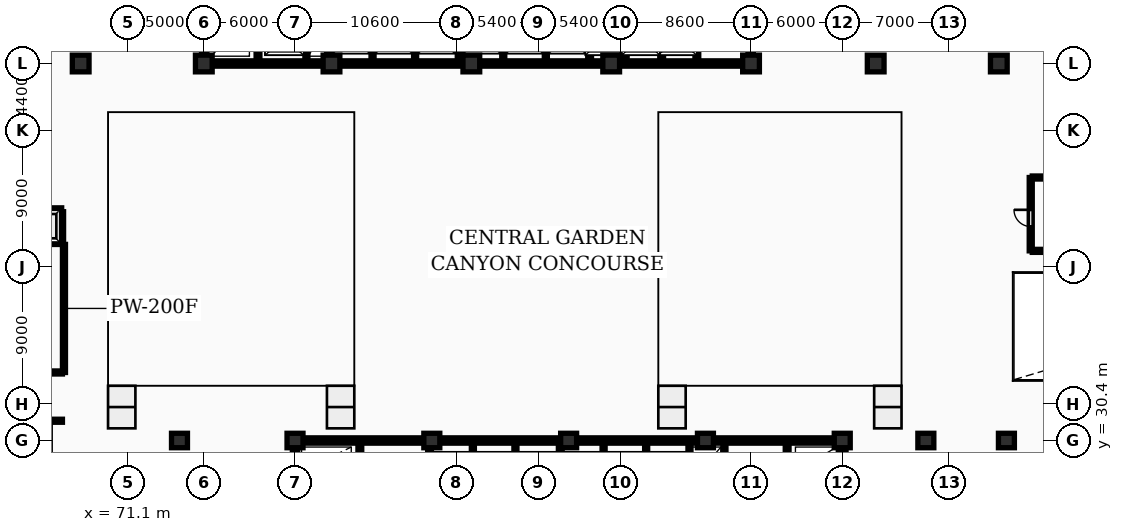
"""IFC4 building model, lengths in metres.
Left out: names, types, materials, properties, quantities, classifications, styles, units other than length and angle.
Written with IfcOpenShell. Run it as: python <this file> out.ifc"""

import sys

from ifc_helpers import new_model, si_unit, direction, frame, frame_2d, origin, origin_2d, place, context, subcontext, project, spatial, rectangle, extrude, element, fill, save


model = new_model("IFC4")
c1 = context("Model", 3, precision=1e-05, world=origin(), true_north=direction((0.0, 1.0)))
c2 = subcontext(c1, "Body", "Model", "MODEL_VIEW")
j1 = project(units=[si_unit("LENGTHUNIT", "METRE"), si_unit("PLANEANGLEUNIT", "RADIAN")], contexts=[c1])
p1 = place(None, origin())
s1 = spatial("IfcSite", under=j1, at=p1, CompositionType="ELEMENT")
p2 = place(p1, origin())
s2 = spatial("IfcBuilding", under=s1, at=p2, CompositionType="ELEMENT")
p3 = place(p2, origin())
s3 = spatial("IfcBuildingStorey", under=s2, at=p3, CompositionType="ELEMENT", Elevation=0.0)
for number, where, z_axis, x_axis in (
    (1, (68.0, 55.2, 0.0), (0.0, 0.0, 1.0), (1.0, 0.0, 0.0)),
    (2, (76.1, 55.2, 0.0), (0.0, 0.0, 1.0), (1.0, 0.0, 0.0)),
    (3, (84.5, 55.2, 0.0), (0.0, 0.0, 1.0), (1.0, 0.0, 0.0)),
    (4, (93.7, 55.2, 0.0), (0.0, 0.0, 1.0), (1.0, 0.0, 0.0)),
    (5, (102.9, 55.2, 0.0), (0.0, 0.0, 1.0), (1.0, 0.0, 0.0)),
    (6, (112.1, 55.2, 0.0), (0.0, 0.0, 1.0), (1.0, 0.0, 0.0)),
    (7, (120.3, 55.2, 0.0), (0.0, 0.0, 1.0), (1.0, 0.0, 0.0)),
    (8, (128.4, 55.2, 0.0), (0.0, 0.0, 1.0), (1.0, 0.0, 0.0)),
):
    element("IfcColumn", number, at=place(p3, frame(where, z_axis=z_axis, x_axis=x_axis)), inside=s3, PredefinedType="COLUMN", context=c2, shape_type="SweptSolid", body=[
        extrude(rectangle(XDim=1.1, YDim=1.1, at=origin_2d()), origin(), (0.0, 0.0, 1.0), 5.4),
    ])
for number, where, z_axis, x_axis in (
    (9, (74.5, 30.4, 0.0), (0.0, 0.0, 1.0), (1.0, 0.0, 0.0)),
    (10, (82.1, 30.4, 0.0), (0.0, 0.0, 1.0), (1.0, 0.0, 0.0)),
    (11, (91.1, 30.4, 0.0), (0.0, 0.0, 1.0), (1.0, 0.0, 0.0)),
    (12, (100.1, 30.4, 0.0), (0.0, 0.0, 1.0), (1.0, 0.0, 0.0)),
    (13, (109.1, 30.4, 0.0), (0.0, 0.0, 1.0), (1.0, 0.0, 0.0)),
    (14, (118.1, 30.4, 0.0), (0.0, 0.0, 1.0), (1.0, 0.0, 0.0)),
    (15, (123.6, 30.4, 0.0), (0.0, 0.0, 1.0), (1.0, 0.0, 0.0)),
    (16, (128.9, 30.4, 0.0), (0.0, 0.0, 1.0), (1.0, 0.0, 0.0)),
):
    element("IfcColumn", number, at=place(p3, frame(where, z_axis=z_axis, x_axis=x_axis)), inside=s3, PredefinedType="COLUMN", context=c2, shape_type="SweptSolid", body=[
        extrude(rectangle(XDim=1.05, YDim=0.95, at=origin_2d()), origin(), (0.0, 0.0, 1.0), 5.4),
    ])
p4 = place(p3, frame((75.95, 55.2, 0.0), z_axis=(0.0, 0.0, 1.0), x_axis=(1.0, 0.0, 0.0)))
e17 = element("IfcWall", 17, at=p4, inside=s3, PredefinedType="SHEAR", context=c2, shape_type="SweptSolid", body=[
    extrude(rectangle(XDim=36.3, YDim=0.35, at=frame_2d((18.15, 0.0))), origin(), (0.0, 0.0, 1.0), 5.4),
])
for number, where, z_axis, x_axis in (
    (18, (76.125, 55.375, 0.0), (0.0, 0.0, 1.0), (0.0, 1.0, 0.0)),
    (19, (112.075, 55.375, 0.0), (0.0, 0.0, 1.0), (0.0, 1.0, 0.0)),
):
    element("IfcWall", number, at=place(p3, frame(where, z_axis=z_axis, x_axis=x_axis)), inside=s3, PredefinedType="SHEAR", context=c2, shape_type="SweptSolid", body=[
        extrude(rectangle(XDim=11.65, YDim=0.35, at=frame_2d((5.825, 0.0))), origin(), (0.0, 0.0, 1.0), 5.4),
    ])
p5 = place(p3, frame((79.665, 55.4, 0.0), z_axis=(0.0, 0.0, 1.0), x_axis=(0.0, 1.0, 0.0)))
e20 = element("IfcWall", 20, at=p5, inside=s3, PredefinedType="SHEAR", context=c2, shape_type="SweptSolid", body=[
    extrude(rectangle(XDim=11.6, YDim=0.25, at=frame_2d((5.8, 0.0))), origin(), (0.0, 0.0, 1.0), 5.4),
])
p6 = place(p5, frame((0.55, 0.0, 0.0)))
e21 = element("IfcOpeningElement", 21, at=p6, cuts=e20, PredefinedType="OPENING", context=c2, shape_type="SweptSolid", body=[
    extrude(rectangle(XDim=0.85, YDim=2.05, at=frame_2d((0.425, 1.025))), frame((0.0, 0.135, 0.0), z_axis=(0.0, -1.0, 0.0), x_axis=(1.0, 0.0, 0.0)), (0.0, 0.0, 1.0), 0.27),
])
p7 = place(p5, frame((8.4, 0.0, 0.0)))
e22 = element("IfcOpeningElement", 22, at=p7, cuts=e20, PredefinedType="OPENING", context=c2, shape_type="SweptSolid", body=[
    extrude(rectangle(XDim=1.1, YDim=2.1, at=frame_2d((0.55, 1.05))), frame((0.0, 0.135, 0.0), z_axis=(0.0, -1.0, 0.0), x_axis=(1.0, 0.0, 0.0)), (0.0, 0.0, 1.0), 0.27),
])
p8 = place(p5, frame((10.25, 0.0, 0.0)))
e23 = element("IfcOpeningElement", 23, at=p8, cuts=e20, PredefinedType="OPENING", context=c2, shape_type="SweptSolid", body=[
    extrude(rectangle(XDim=0.85, YDim=2.05, at=frame_2d((0.425, 1.025))), frame((0.0, 0.135, 0.0), z_axis=(0.0, -1.0, 0.0), x_axis=(1.0, 0.0, 0.0)), (0.0, 0.0, 1.0), 0.27),
])
p9 = place(p3, frame((82.85, 55.4, 0.0), z_axis=(0.0, 0.0, 1.0), x_axis=(0.0, 1.0, 0.0)))
e24 = element("IfcWall", 24, at=p9, inside=s3, PredefinedType="PARTITIONING", context=c2, shape_type="SweptSolid", body=[
    extrude(rectangle(XDim=2.56, YDim=0.2, at=frame_2d((1.28, 0.0))), origin(), (0.0, 0.0, 1.0), 5.1),
])
p10 = place(p3, frame((84.3, 55.4, 0.0), z_axis=(0.0, 0.0, 1.0), x_axis=(0.0, 1.0, 0.0)))
e25 = element("IfcWall", 25, at=p10, inside=s3, PredefinedType="SHEAR", context=c2, shape_type="SweptSolid", body=[
    extrude(rectangle(XDim=11.6, YDim=0.25, at=frame_2d((5.8, 0.0))), origin(), (0.0, 0.0, 1.0), 5.4),
])
p11 = place(p10, frame((5.2, 0.0, 0.0)))
e26 = element("IfcOpeningElement", 26, at=p11, cuts=e25, PredefinedType="OPENING", context=c2, shape_type="SweptSolid", body=[
    extrude(rectangle(XDim=1.1, YDim=2.1, at=frame_2d((0.55, 1.05))), frame((0.0, 0.135, 0.0), z_axis=(0.0, -1.0, 0.0), x_axis=(1.0, 0.0, 0.0)), (0.0, 0.0, 1.0), 0.27),
])
for number, where, z_axis, x_axis in (
    (27, (87.2, 55.4, 0.0), (0.0, 0.0, 1.0), (0.0, 1.0, 0.0)),
    (28, (90.0, 55.4, 0.0), (0.0, 0.0, 1.0), (0.0, 1.0, 0.0)),
):
    element("IfcWall", number, at=place(p3, frame(where, z_axis=z_axis, x_axis=x_axis)), inside=s3, PredefinedType="PARTITIONING", context=c2, shape_type="SweptSolid", body=[
        extrude(rectangle(XDim=2.72, YDim=0.2, at=frame_2d((1.36, 0.0))), origin(), (0.0, 0.0, 1.0), 5.1),
    ])
p12 = place(p3, frame((92.9, 55.4, 0.0), z_axis=(0.0, 0.0, 1.0), x_axis=(0.0, 1.0, 0.0)))
e29 = element("IfcWall", 29, at=p12, inside=s3, PredefinedType="SHEAR", context=c2, shape_type="SweptSolid", body=[
    extrude(rectangle(XDim=2.85, YDim=0.25, at=frame_2d((1.425, 0.0))), origin(), (0.0, 0.0, 1.0), 5.4),
])
for number, where, z_axis, x_axis in (
    (30, (95.8, 55.4, 0.0), (0.0, 0.0, 1.0), (0.0, 1.0, 0.0)),
    (31, (98.6, 55.4, 0.0), (0.0, 0.0, 1.0), (0.0, 1.0, 0.0)),
):
    element("IfcWall", number, at=place(p3, frame(where, z_axis=z_axis, x_axis=x_axis)), inside=s3, PredefinedType="PARTITIONING", context=c2, shape_type="SweptSolid", body=[
        extrude(rectangle(XDim=2.72, YDim=0.2, at=frame_2d((1.36, 0.0))), origin(), (0.0, 0.0, 1.0), 5.1),
    ])
p13 = place(p3, frame((101.48, 55.4, 0.0), z_axis=(0.0, 0.0, 1.0), x_axis=(0.0, 1.0, 0.0)))
e32 = element("IfcWall", 32, at=p13, inside=s3, PredefinedType="SHEAR", context=c2, shape_type="SweptSolid", body=[
    extrude(rectangle(XDim=2.85, YDim=0.25, at=frame_2d((1.425, 0.0))), origin(), (0.0, 0.0, 1.0), 5.4),
])
p14 = place(p3, frame((103.85, 55.4, 0.0), z_axis=(0.0, 0.0, 1.0), x_axis=(0.0, 1.0, 0.0)))
e33 = element("IfcWall", 33, at=p14, inside=s3, PredefinedType="PARTITIONING", context=c2, shape_type="SweptSolid", body=[
    extrude(rectangle(XDim=2.72, YDim=0.2, at=frame_2d((1.36, 0.0))), origin(), (0.0, 0.0, 1.0), 5.1),
])
p15 = place(p3, frame((106.22, 55.4, 0.0), z_axis=(0.0, 0.0, 1.0), x_axis=(0.0, 1.0, 0.0)))
e34 = element("IfcWall", 34, at=p15, inside=s3, PredefinedType="SHEAR", context=c2, shape_type="SweptSolid", body=[
    extrude(rectangle(XDim=2.85, YDim=0.25, at=frame_2d((1.425, 0.0))), origin(), (0.0, 0.0, 1.0), 5.4),
])
p16 = place(p3, frame((108.535, 55.4, 0.0), z_axis=(0.0, 0.0, 1.0), x_axis=(0.0, 1.0, 0.0)))
e35 = element("IfcWall", 35, at=p16, inside=s3, PredefinedType="SHEAR", context=c2, shape_type="SweptSolid", body=[
    extrude(rectangle(XDim=11.6, YDim=0.25, at=frame_2d((5.8, 0.0))), origin(), (0.0, 0.0, 1.0), 5.4),
])
p17 = place(p16, frame((8.2, 0.0, 0.0)))
e36 = element("IfcOpeningElement", 36, at=p17, cuts=e35, PredefinedType="OPENING", context=c2, shape_type="SweptSolid", body=[
    extrude(rectangle(XDim=1.1, YDim=2.1, at=frame_2d((0.55, 1.05))), frame((0.0, 0.135, 0.0), z_axis=(0.0, -1.0, 0.0), x_axis=(1.0, 0.0, 0.0)), (0.0, 0.0, 1.0), 0.27),
])
p18 = place(p16, frame((10.25, 0.0, 0.0)))
e37 = element("IfcOpeningElement", 37, at=p18, cuts=e35, PredefinedType="OPENING", context=c2, shape_type="SweptSolid", body=[
    extrude(rectangle(XDim=0.85, YDim=2.05, at=frame_2d((0.425, 1.025))), frame((0.0, 0.135, 0.0), z_axis=(0.0, -1.0, 0.0), x_axis=(1.0, 0.0, 0.0)), (0.0, 0.0, 1.0), 0.27),
])
p19 = place(p3, frame((81.925, 30.4, 0.0), z_axis=(0.0, 0.0, 1.0), x_axis=(1.0, 0.0, 0.0)))
e38 = element("IfcWall", 38, at=p19, inside=s3, PredefinedType="SHEAR", context=c2, shape_type="SweptSolid", body=[
    extrude(rectangle(XDim=36.265, YDim=0.35, at=frame_2d((18.132, 0.0))), origin(), (0.0, 0.0, 1.0), 5.4),
])
for number, where, z_axis, x_axis in (
    (39, (82.1, 18.575, 0.0), (0.0, 0.0, 1.0), (0.0, 1.0, 0.0)),
    (40, (118.015, 18.575, 0.0), (0.0, 0.0, 1.0), (0.0, 1.0, 0.0)),
):
    element("IfcWall", number, at=place(p3, frame(where, z_axis=z_axis, x_axis=x_axis)), inside=s3, PredefinedType="SHEAR", context=c2, shape_type="SweptSolid", body=[
        extrude(rectangle(XDim=11.65, YDim=0.35, at=frame_2d((5.825, 0.0))), origin(), (0.0, 0.0, 1.0), 5.4),
    ])
p20 = place(p3, frame((86.365, 18.6, 0.0), z_axis=(0.0, 0.0, 1.0), x_axis=(0.0, 1.0, 0.0)))
e41 = element("IfcWall", 41, at=p20, inside=s3, PredefinedType="SHEAR", context=c2, shape_type="SweptSolid", body=[
    extrude(rectangle(XDim=11.6, YDim=0.25, at=frame_2d((5.8, 0.0))), origin(), (0.0, 0.0, 1.0), 5.4),
])
p21 = place(p20, frame((0.45, 0.0, 0.0)))
e42 = element("IfcOpeningElement", 42, at=p21, cuts=e41, PredefinedType="OPENING", context=c2, shape_type="SweptSolid", body=[
    extrude(rectangle(XDim=0.85, YDim=2.05, at=frame_2d((0.425, 1.025))), frame((0.0, 0.135, 0.0), z_axis=(0.0, -1.0, 0.0), x_axis=(1.0, 0.0, 0.0)), (0.0, 0.0, 1.0), 0.27),
])
p22 = place(p20, frame((2.05, 0.0, 0.0)))
e43 = element("IfcOpeningElement", 43, at=p22, cuts=e41, PredefinedType="OPENING", context=c2, shape_type="SweptSolid", body=[
    extrude(rectangle(XDim=1.1, YDim=2.1, at=frame_2d((0.55, 1.05))), frame((0.0, 0.135, 0.0), z_axis=(0.0, -1.0, 0.0), x_axis=(1.0, 0.0, 0.0)), (0.0, 0.0, 1.0), 0.27),
])
p23 = place(p20, frame((9.95, 0.0, 0.0)))
e44 = element("IfcOpeningElement", 44, at=p23, cuts=e41, PredefinedType="OPENING", context=c2, shape_type="SweptSolid", body=[
    extrude(rectangle(XDim=0.85, YDim=2.05, at=frame_2d((0.425, 1.025))), frame((0.0, 0.135, 0.0), z_axis=(0.0, -1.0, 0.0), x_axis=(1.0, 0.0, 0.0)), (0.0, 0.0, 1.0), 0.27),
])
p24 = place(p3, frame((90.95, 18.6, 0.0), z_axis=(0.0, 0.0, 1.0), x_axis=(0.0, 1.0, 0.0)))
e45 = element("IfcWall", 45, at=p24, inside=s3, PredefinedType="SHEAR", context=c2, shape_type="SweptSolid", body=[
    extrude(rectangle(XDim=11.6, YDim=0.25, at=frame_2d((5.8, 0.0))), origin(), (0.0, 0.0, 1.0), 5.4),
])
p25 = place(p24, frame((4.6, 0.0, 0.0)))
e46 = element("IfcOpeningElement", 46, at=p25, cuts=e45, PredefinedType="OPENING", context=c2, shape_type="SweptSolid", body=[
    extrude(rectangle(XDim=1.1, YDim=2.1, at=frame_2d((0.55, 1.05))), frame((0.0, 0.135, 0.0), z_axis=(0.0, -1.0, 0.0), x_axis=(1.0, 0.0, 0.0)), (0.0, 0.0, 1.0), 0.27),
])
for number, where, z_axis, x_axis in (
    (47, (93.8, 27.38, 0.0), (0.0, 0.0, 1.0), (0.0, 1.0, 0.0)),
    (48, (96.6, 27.38, 0.0), (0.0, 0.0, 1.0), (0.0, 1.0, 0.0)),
):
    element("IfcWall", number, at=place(p3, frame(where, z_axis=z_axis, x_axis=x_axis)), inside=s3, PredefinedType="PARTITIONING", context=c2, shape_type="SweptSolid", body=[
        extrude(rectangle(XDim=2.82, YDim=0.2, at=frame_2d((1.41, 0.0))), origin(), (0.0, 0.0, 1.0), 5.1),
    ])
p26 = place(p3, frame((99.55, 27.25, 0.0), z_axis=(0.0, 0.0, 1.0), x_axis=(0.0, 1.0, 0.0)))
e49 = element("IfcWall", 49, at=p26, inside=s3, PredefinedType="SHEAR", context=c2, shape_type="SweptSolid", body=[
    extrude(rectangle(XDim=2.95, YDim=0.25, at=frame_2d((1.475, 0.0))), origin(), (0.0, 0.0, 1.0), 5.4),
])
for number, where, z_axis, x_axis in (
    (50, (102.4, 27.38, 0.0), (0.0, 0.0, 1.0), (0.0, 1.0, 0.0)),
    (51, (105.2, 27.38, 0.0), (0.0, 0.0, 1.0), (0.0, 1.0, 0.0)),
    (52, (108.05, 27.38, 0.0), (0.0, 0.0, 1.0), (0.0, 1.0, 0.0)),
):
    element("IfcWall", number, at=place(p3, frame(where, z_axis=z_axis, x_axis=x_axis)), inside=s3, PredefinedType="PARTITIONING", context=c2, shape_type="SweptSolid", body=[
        extrude(rectangle(XDim=2.82, YDim=0.2, at=frame_2d((1.41, 0.0))), origin(), (0.0, 0.0, 1.0), 5.1),
    ])
p27 = place(p3, frame((110.35, 18.6, 0.0), z_axis=(0.0, 0.0, 1.0), x_axis=(0.0, 1.0, 0.0)))
e53 = element("IfcWall", 53, at=p27, inside=s3, PredefinedType="PARTITIONING", context=c2, shape_type="SweptSolid", body=[
    extrude(rectangle(XDim=11.6, YDim=0.2, at=frame_2d((5.8, 0.0))), origin(), (0.0, 0.0, 1.0), 5.1),
])
p28 = place(p27, frame((5.2, 0.0, 0.0)))
e54 = element("IfcOpeningElement", 54, at=p28, cuts=e53, PredefinedType="OPENING", context=c2, shape_type="SweptSolid", body=[
    extrude(rectangle(XDim=1.1, YDim=2.15, at=frame_2d((0.55, 1.075))), frame((0.0, 0.11, 0.0), z_axis=(0.0, -1.0, 0.0), x_axis=(1.0, 0.0, 0.0)), (0.0, 0.0, 1.0), 0.22),
])
p29 = place(p3, frame((114.475, 18.6, 0.0), z_axis=(0.0, 0.0, 1.0), x_axis=(0.0, 1.0, 0.0)))
e55 = element("IfcWall", 55, at=p29, inside=s3, PredefinedType="SHEAR", context=c2, shape_type="SweptSolid", body=[
    extrude(rectangle(XDim=11.6, YDim=0.25, at=frame_2d((5.8, 0.0))), origin(), (0.0, 0.0, 1.0), 5.4),
])
p30 = place(p29, frame((0.45, 0.0, 0.0)))
e56 = element("IfcOpeningElement", 56, at=p30, cuts=e55, PredefinedType="OPENING", context=c2, shape_type="SweptSolid", body=[
    extrude(rectangle(XDim=0.85, YDim=2.05, at=frame_2d((0.425, 1.025))), frame((0.0, 0.135, 0.0), z_axis=(0.0, -1.0, 0.0), x_axis=(1.0, 0.0, 0.0)), (0.0, 0.0, 1.0), 0.27),
])
p31 = place(p29, frame((2.05, 0.0, 0.0)))
e57 = element("IfcOpeningElement", 57, at=p31, cuts=e55, PredefinedType="OPENING", context=c2, shape_type="SweptSolid", body=[
    extrude(rectangle(XDim=1.1, YDim=2.1, at=frame_2d((0.55, 1.05))), frame((0.0, 0.135, 0.0), z_axis=(0.0, -1.0, 0.0), x_axis=(1.0, 0.0, 0.0)), (0.0, 0.0, 1.0), 0.27),
])
p32 = place(p29, frame((9.95, 0.0, 0.0)))
e58 = element("IfcOpeningElement", 58, at=p32, cuts=e55, PredefinedType="OPENING", context=c2, shape_type="SweptSolid", body=[
    extrude(rectangle(XDim=0.85, YDim=2.05, at=frame_2d((0.425, 1.025))), frame((0.0, 0.135, 0.0), z_axis=(0.0, -1.0, 0.0), x_axis=(1.0, 0.0, 0.0)), (0.0, 0.0, 1.0), 0.27),
])
p33 = place(p3, frame((61.25, 43.42, 0.0), z_axis=(0.0, 0.0, 1.0), x_axis=(1.0, 0.0, 0.0)))
e59 = element("IfcWall", 59, at=p33, inside=s3, PredefinedType="SHEAR", context=c2, shape_type="SweptSolid", body=[
    extrude(rectangle(XDim=5.5, YDim=0.25, at=frame_2d((2.75, 0.0))), origin(), (0.0, 0.0, 1.0), 5.4),
])
p34 = place(p33, frame((0.74, 0.0, 0.0)))
e60 = element("IfcOpeningElement", 60, at=p34, cuts=e59, PredefinedType="OPENING", context=c2, shape_type="SweptSolid", body=[
    extrude(rectangle(XDim=1.02, YDim=2.12, at=frame_2d((0.51, 1.06))), frame((0.0, 0.135, 0.0), z_axis=(0.0, -1.0, 0.0), x_axis=(1.0, 0.0, 0.0)), (0.0, 0.0, 1.0), 0.27),
])
p35 = place(p33, frame((3.74, 0.0, 0.0)))
e61 = element("IfcOpeningElement", 61, at=p35, cuts=e59, PredefinedType="OPENING", context=c2, shape_type="SweptSolid", body=[
    extrude(rectangle(XDim=1.02, YDim=2.12, at=frame_2d((0.51, 1.06))), frame((0.0, 0.135, 0.0), z_axis=(0.0, -1.0, 0.0), x_axis=(1.0, 0.0, 0.0)), (0.0, 0.0, 1.0), 0.27),
])
p36 = place(p3, frame((61.25, 45.58, 0.0), z_axis=(0.0, 0.0, 1.0), x_axis=(1.0, 0.0, 0.0)))
e62 = element("IfcWall", 62, at=p36, inside=s3, PredefinedType="SHEAR", context=c2, shape_type="SweptSolid", body=[
    extrude(rectangle(XDim=5.5, YDim=0.25, at=frame_2d((2.75, 0.0))), origin(), (0.0, 0.0, 1.0), 5.4),
])
p37 = place(p3, frame((66.75, 43.55, 0.0), z_axis=(0.0, 0.0, 1.0), x_axis=(0.0, 1.0, 0.0)))
e63 = element("IfcWall", 63, at=p37, inside=s3, PredefinedType="SHEAR", context=c2, shape_type="SweptSolid", body=[
    extrude(rectangle(XDim=1.9, YDim=0.25, at=frame_2d((0.95, 0.0))), origin(), (0.0, 0.0, 1.0), 5.4),
])
p38 = place(p3, frame((59.84, 34.875, 0.0), z_axis=(0.0, 0.0, 1.0), x_axis=(1.0, 0.0, 0.0)))
e64 = element("IfcWall", 64, at=p38, inside=s3, PredefinedType="PARTITIONING", context=c2, shape_type="SweptSolid", body=[
    extrude(rectangle(XDim=6.96, YDim=0.2, at=frame_2d((3.48, 0.0))), origin(), (0.0, 0.0, 1.0), 5.1),
])
p39 = place(p38, frame((2.6, 0.0, 0.0)))
e65 = element("IfcOpeningElement", 65, at=p39, cuts=e64, PredefinedType="OPENING", context=c2, shape_type="SweptSolid", body=[
    extrude(rectangle(XDim=1.2, YDim=2.18, at=frame_2d((0.6, 1.09))), frame((0.0, 0.11, 0.0), z_axis=(0.0, -1.0, 0.0), x_axis=(1.0, 0.0, 0.0)), (0.0, 0.0, 1.0), 0.22),
])
p40 = place(p3, frame((66.9, 34.875, 0.0), z_axis=(0.0, 0.0, 1.0), x_axis=(0.0, 1.0, 0.0)))
e66 = element("IfcWall", 66, at=p40, inside=s3, PredefinedType="PARTITIONING", context=c2, shape_type="SweptSolid", body=[
    extrude(rectangle(XDim=8.425, YDim=0.2, at=frame_2d((4.212, 0.0))), origin(), (0.0, 0.0, 1.0), 5.1),
])
p41 = place(p3, frame((130.5, 42.875, 0.0), z_axis=(0.0, 0.0, 1.0), x_axis=(0.0, 1.0, 0.0)))
e67 = element("IfcWall", 67, at=p41, inside=s3, PredefinedType="PARTITIONING", context=c2, shape_type="SweptSolid", body=[
    extrude(rectangle(XDim=4.825, YDim=0.2, at=frame_2d((2.413, 0.0))), origin(), (0.0, 0.0, 1.0), 5.1),
])
p42 = place(p41, frame((1.6, 0.0, 0.0)))
e68 = element("IfcOpeningElement", 68, at=p42, cuts=e67, PredefinedType="OPENING", context=c2, shape_type="SweptSolid", body=[
    extrude(rectangle(XDim=1.1, YDim=2.15, at=frame_2d((0.55, 1.075))), frame((0.0, 0.11, 0.0), z_axis=(0.0, -1.0, 0.0), x_axis=(1.0, 0.0, 0.0)), (0.0, 0.0, 1.0), 0.22),
])
p43 = place(p3, frame((130.6, 47.7, 0.0), z_axis=(0.0, 0.0, 1.0), x_axis=(1.0, 0.0, 0.0)))
e69 = element("IfcWall", 69, at=p43, inside=s3, PredefinedType="PARTITIONING", context=c2, shape_type="SweptSolid", body=[
    extrude(rectangle(XDim=3.65, YDim=0.2, at=frame_2d((1.825, 0.0))), origin(), (0.0, 0.0, 1.0), 5.1),
])
p44 = place(p3, frame((43.8, 31.7, 0.0), z_axis=(0.0, 0.0, 1.0), x_axis=(1.0, 0.0, 0.0)))
e70 = element("IfcWall", 70, at=p44, inside=s3, PredefinedType="PARTITIONING", context=c2, shape_type="SweptSolid", body=[
    extrude(rectangle(XDim=23.0, YDim=0.2, at=frame_2d((11.5, 0.0))), origin(), (0.0, 0.0, 1.0), 5.1),
])
p45 = place(p44, frame((11.0, 0.0, 0.0)))
e71 = element("IfcOpeningElement", 71, at=p45, cuts=e70, PredefinedType="OPENING", context=c2, shape_type="SweptSolid", body=[
    extrude(rectangle(XDim=1.1, YDim=2.1, at=frame_2d((0.55, 1.05))), frame((0.0, 0.11, 0.0), z_axis=(0.0, -1.0, 0.0), x_axis=(1.0, 0.0, 0.0)), (0.0, 0.0, 1.0), 0.22),
])
p46 = place(p3, frame((130.6, 42.875, 0.0), z_axis=(0.0, 0.0, 1.0), x_axis=(1.0, 0.0, 0.0)))
e72 = element("IfcWall", 72, at=p46, inside=s3, PredefinedType="PARTITIONING", context=c2, shape_type="SweptSolid", body=[
    extrude(rectangle(XDim=3.65, YDim=0.2, at=frame_2d((1.825, 0.0))), origin(), (0.0, 0.0, 1.0), 5.1),
])
p47 = place(p3, frame((118.25, -4.9, 0.0), z_axis=(0.0, 0.0, 1.0), x_axis=(0.0, 1.0, 0.0)))
e73 = element("IfcWall", 73, at=p47, inside=s3, PredefinedType="PARTITIONING", context=c2, shape_type="SweptSolid", body=[
    extrude(rectangle(XDim=35.35, YDim=0.2, at=frame_2d((17.675, 0.0))), origin(), (0.0, 0.0, 1.0), 4.35),
])
p48 = place(p47, frame((16.0, 0.0, 0.0)))
e74 = element("IfcOpeningElement", 74, at=p48, cuts=e73, PredefinedType="OPENING", context=c2, shape_type="SweptSolid", body=[
    extrude(rectangle(XDim=1.22, YDim=2.18, at=frame_2d((0.61, 1.09))), frame((0.0, 0.11, 0.0), z_axis=(0.0, -1.0, 0.0), x_axis=(1.0, 0.0, 0.0)), (0.0, 0.0, 1.0), 0.22),
])
p49 = place(p42, origin())
e75 = element("IfcDoor", 75, at=p49, inside=s3, OperationType="SINGLE_SWING_RIGHT", PredefinedType="DOOR", context=c2, shape_type="SweptSolid", body=[
    extrude(rectangle(XDim=1.1, YDim=2.15, at=frame_2d((0.55, 1.075))), frame((0.0, 0.025, 0.0), z_axis=(0.0, -1.0, 0.0), x_axis=(1.0, 0.0, 0.0)), (0.0, 0.0, 1.0), 0.05),
])
fill(e68, e75)
save(model, sys.argv[1])
